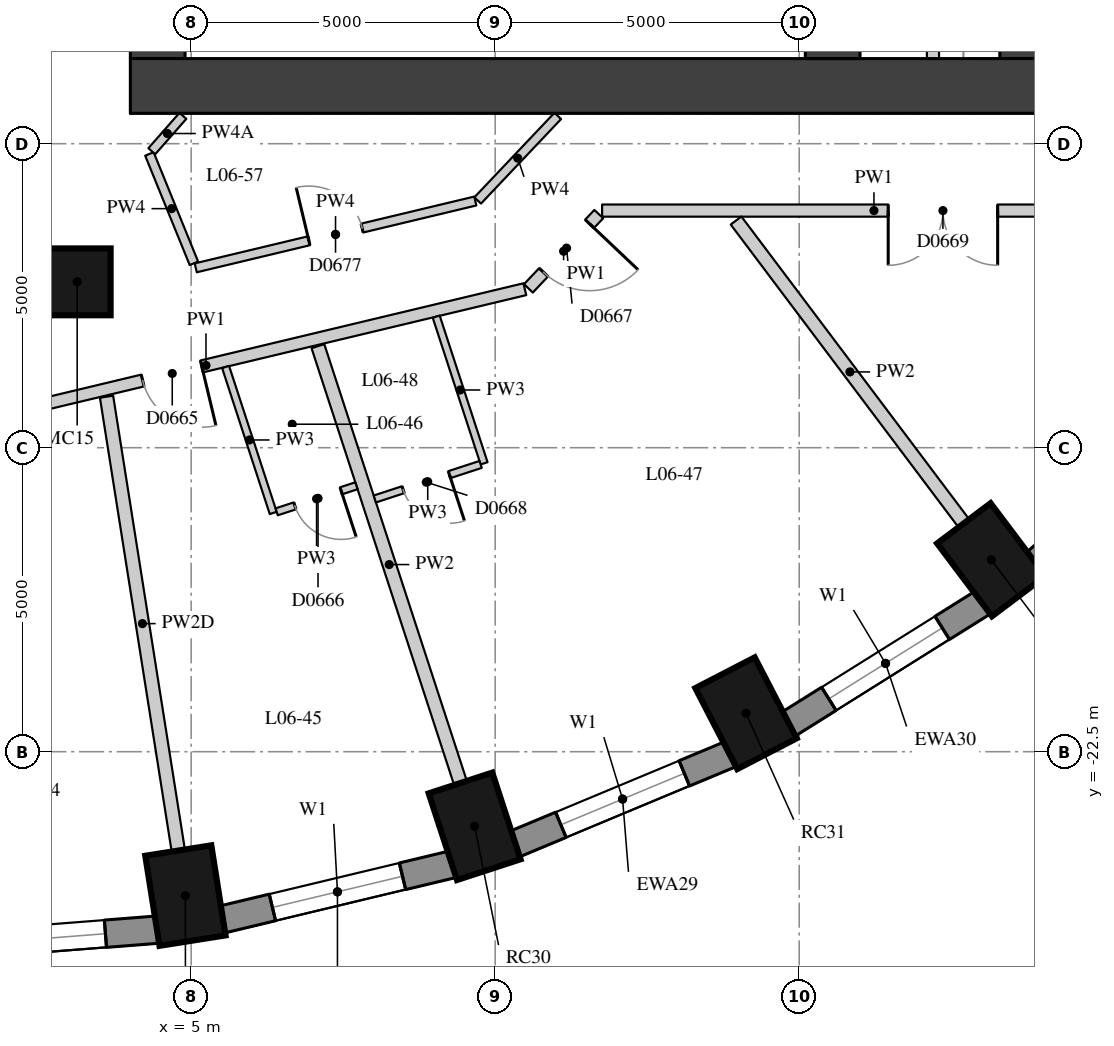
"""IFC4 building model, lengths in metres.
Left out: names, types, materials, properties, quantities, classifications, styles, units other than length and angle.
Written with IfcOpenShell. Run it as: python <this file> out.ifc"""

import sys

from ifc_helpers import new_model, si_unit, direction, frame, frame_2d, origin, origin_2d, place, context, subcontext, project, spatial, rectangle, extrude, element, fill, save


model = new_model("IFC4")
c1 = context("Model", 3, precision=1e-05, world=origin(), true_north=direction((0.0, 1.0)))
c2 = subcontext(c1, "Body", "Model", "MODEL_VIEW")
j1 = project(units=[si_unit("LENGTHUNIT", "METRE"), si_unit("PLANEANGLEUNIT", "RADIAN")], contexts=[c1])
p1 = place(None, origin())
s1 = spatial("IfcSite", under=j1, at=p1, CompositionType="ELEMENT")
p2 = place(p1, origin())
s2 = spatial("IfcBuilding", under=s1, at=p2, CompositionType="ELEMENT")
p3 = place(p2, frame((0.0, 0.0, 28.3)))
s3 = spatial("IfcBuildingStorey", under=s2, at=p3, CompositionType="ELEMENT", Elevation=28.3)
for number, where, z_axis, x_axis in (
    (1, (4.906, -24.866, 0.0), (0.0, 0.0, 1.0), (0.156, -0.988, 0.0)),
    (2, (9.662, -23.727, 0.0), (0.0, 0.0, 1.0), (0.31, -0.951, 0.0)),
    (3, (14.125, -21.867, 0.0), (0.0, 0.0, 1.0), (0.46, -0.888, 0.0)),
    (4, (18.159, -19.343, 0.0), (0.0, 0.0, 1.0), (0.601, -0.799, 0.0)),
):
    element("IfcColumn", number, at=place(p3, frame(where, z_axis=z_axis, x_axis=x_axis)), inside=s3, PredefinedType="COLUMN", context=c2, shape_type="SweptSolid", body=[
        extrude(rectangle(XDim=1.5, YDim=1.1, at=origin_2d()), origin(), (0.0, 0.0, 1.0), 3.3),
    ])
p4 = place(p3, frame((3.126, -14.772, 0.0), z_axis=(0.0, 0.0, 1.0), x_axis=(1.0, 0.0, 0.0)))
e5 = element("IfcColumn", 5, at=p4, inside=s3, PredefinedType="COLUMN", context=c2, shape_type="SweptSolid", body=[
    extrude(rectangle(XDim=1.1, YDim=1.1, at=origin_2d()), origin(), (0.0, 0.0, 1.0), 3.3),
])
p5 = place(p3, frame((0.53, -25.733, 0.0), z_axis=(0.0, 0.0, 1.0), x_axis=(0.996955972145, 0.077966592873, 0.0)))
e6 = element("IfcWall", 6, at=p5, inside=s3, PredefinedType="SOLIDWALL", context=c2, shape_type="SweptSolid", body=[
    extrude(rectangle(XDim=3.939, YDim=0.45, at=frame_2d((1.97, 0.0))), origin(), (0.0, 0.0, 1.0), 3.02),
])
p6 = place(p5, frame((0.87, 0.0, 0.4)))
e7 = element("IfcOpeningElement", 7, at=p6, cuts=e6, PredefinedType="OPENING", context=c2, shape_type="SweptSolid", body=[
    extrude(rectangle(XDim=2.2, YDim=1.75, at=frame_2d((1.1, 0.875))), frame((0.0, 0.235, 0.0), z_axis=(0.0, -1.0, 0.0), x_axis=(1.0, 0.0, 0.0)), (0.0, 0.0, 1.0), 0.47),
])
p7 = place(p3, frame((5.504, -25.26, 0.0), z_axis=(0.0, 0.0, 1.0), x_axis=(0.972496561493, 0.232917233979, 0.0)))
e8 = element("IfcWall", 8, at=p7, inside=s3, PredefinedType="SOLIDWALL", context=c2, shape_type="SweptSolid", body=[
    extrude(rectangle(XDim=3.911, YDim=0.45, at=frame_2d((1.956, 0.0))), origin(), (0.0, 0.0, 1.0), 3.02),
])
p8 = place(p7, frame((0.855, 0.0, 0.4)))
e9 = element("IfcOpeningElement", 9, at=p8, cuts=e8, PredefinedType="OPENING", context=c2, shape_type="SweptSolid", body=[
    extrude(rectangle(XDim=2.2, YDim=1.75, at=frame_2d((1.1, 0.875))), frame((0.0, 0.235, 0.0), z_axis=(0.0, -1.0, 0.0), x_axis=(1.0, 0.0, 0.0)), (0.0, 0.0, 1.0), 0.47),
])
p9 = place(p3, frame((10.315, -24.021, 0.0), z_axis=(0.0, 0.0, 1.0), x_axis=(0.923031964282, 0.384723267966, 0.0)))
e10 = element("IfcWall", 10, at=p9, inside=s3, PredefinedType="SOLIDWALL", context=c2, shape_type="SweptSolid", body=[
    extrude(rectangle(XDim=3.856, YDim=0.45, at=frame_2d((1.928, 0.0))), origin(), (0.0, 0.0, 1.0), 3.02),
])
p10 = place(p9, frame((0.828, 0.0, 0.4)))
e11 = element("IfcOpeningElement", 11, at=p10, cuts=e10, PredefinedType="OPENING", context=c2, shape_type="SweptSolid", body=[
    extrude(rectangle(XDim=2.2, YDim=1.75, at=frame_2d((1.1, 0.875))), frame((0.0, 0.235, 0.0), z_axis=(0.0, -1.0, 0.0), x_axis=(1.0, 0.0, 0.0)), (0.0, 0.0, 1.0), 0.47),
])
p11 = place(p3, frame((14.817, -22.051, 0.0), z_axis=(0.0, 0.0, 1.0), x_axis=(0.847635480093, 0.530579016629, 0.0)))
e12 = element("IfcWall", 12, at=p11, inside=s3, PredefinedType="SOLIDWALL", context=c2, shape_type="SweptSolid", body=[
    extrude(rectangle(XDim=3.782, YDim=0.45, at=frame_2d((1.891, 0.0))), origin(), (0.0, 0.0, 1.0), 3.02),
])
p12 = place(p11, frame((0.791, 0.0, 0.4)))
e13 = element("IfcOpeningElement", 13, at=p12, cuts=e12, PredefinedType="OPENING", context=c2, shape_type="SweptSolid", body=[
    extrude(rectangle(XDim=2.2, YDim=1.75, at=frame_2d((1.1, 0.875))), frame((0.0, 0.235, 0.0), z_axis=(0.0, -1.0, 0.0), x_axis=(1.0, 0.0, 0.0)), (0.0, 0.0, 1.0), 0.47),
])
p13 = place(p3, frame((18.871, -19.407, 0.0), z_axis=(0.0, 0.0, 1.0), x_axis=(0.745526233716, 0.66647628228, 0.0)))
e14 = element("IfcWall", 14, at=p13, inside=s3, PredefinedType="SOLIDWALL", context=c2, shape_type="SweptSolid", body=[
    extrude(rectangle(XDim=3.697, YDim=0.45, at=frame_2d((1.848, 0.0))), origin(), (0.0, 0.0, 1.0), 3.02),
])
p14 = place(p3, frame((4.45, -11.1, 0.0), z_axis=(0.0, 0.0, 1.0), x_axis=(0.0, 1.0, 0.0)))
e15 = element("IfcWall", 15, at=p14, inside=s3, PredefinedType="SHEAR", context=c2, shape_type="SweptSolid", body=[
    extrude(rectangle(XDim=22.2, YDim=0.9, at=frame_2d((11.1, 0.0))), origin(), (0.0, 0.0, 1.0), 3.02),
])
p15 = place(p14, frame((2.35, 0.0, 0.0)))
e16 = element("IfcOpeningElement", 16, at=p15, cuts=e15, PredefinedType="OPENING", context=c2, shape_type="SweptSolid", body=[
    extrude(rectangle(XDim=1.5, YDim=2.1, at=frame_2d((0.75, 1.05))), frame((0.0, 0.46, 0.0), z_axis=(0.0, -1.0, 0.0), x_axis=(1.0, 0.0, 0.0)), (0.0, 0.0, 1.0), 0.92),
])
p16 = place(p14, frame((5.45, 0.0, 0.0)))
e17 = element("IfcOpeningElement", 17, at=p16, cuts=e15, PredefinedType="OPENING", context=c2, shape_type="SweptSolid", body=[
    extrude(rectangle(XDim=1.8, YDim=2.1, at=frame_2d((0.9, 1.05))), frame((0.0, 0.46, 0.0), z_axis=(0.0, -1.0, 0.0), x_axis=(1.0, 0.0, 0.0)), (0.0, 0.0, 1.0), 0.92),
])
p17 = place(p14, frame((7.95, 0.0, 0.0)))
e18 = element("IfcOpeningElement", 18, at=p17, cuts=e15, PredefinedType="OPENING", context=c2, shape_type="SweptSolid", body=[
    extrude(rectangle(XDim=1.1, YDim=2.1, at=frame_2d((0.55, 1.05))), frame((0.0, 0.46, 0.0), z_axis=(0.0, -1.0, 0.0), x_axis=(1.0, 0.0, 0.0)), (0.0, 0.0, 1.0), 0.92),
])
p18 = place(p14, frame((10.6, 0.0, 0.0)))
e19 = element("IfcOpeningElement", 19, at=p18, cuts=e15, PredefinedType="OPENING", context=c2, shape_type="SweptSolid", body=[
    extrude(rectangle(XDim=1.0, YDim=2.1, at=frame_2d((0.5, 1.05))), frame((0.0, 0.46, 0.0), z_axis=(0.0, -1.0, 0.0), x_axis=(1.0, 0.0, 0.0)), (0.0, 0.0, 1.0), 0.92),
])
p19 = place(p14, frame((13.15, 0.0, 0.0)))
e20 = element("IfcOpeningElement", 20, at=p19, cuts=e15, PredefinedType="OPENING", context=c2, shape_type="SweptSolid", body=[
    extrude(rectangle(XDim=1.1, YDim=2.1, at=frame_2d((0.55, 1.05))), frame((0.0, 0.46, 0.0), z_axis=(0.0, -1.0, 0.0), x_axis=(1.0, 0.0, 0.0)), (0.0, 0.0, 1.0), 0.92),
])
p20 = place(p14, frame((14.95, 0.0, 0.0)))
e21 = element("IfcOpeningElement", 21, at=p20, cuts=e15, PredefinedType="OPENING", context=c2, shape_type="SweptSolid", body=[
    extrude(rectangle(XDim=1.8, YDim=2.1, at=frame_2d((0.9, 1.05))), frame((0.0, 0.46, 0.0), z_axis=(0.0, -1.0, 0.0), x_axis=(1.0, 0.0, 0.0)), (0.0, 0.0, 1.0), 0.92),
])
p21 = place(p14, frame((18.35, 0.0, 0.0)))
e22 = element("IfcOpeningElement", 22, at=p21, cuts=e15, PredefinedType="OPENING", context=c2, shape_type="SweptSolid", body=[
    extrude(rectangle(XDim=1.5, YDim=2.1, at=frame_2d((0.75, 1.05))), frame((0.0, 0.46, 0.0), z_axis=(0.0, -1.0, 0.0), x_axis=(1.0, 0.0, 0.0)), (0.0, 0.0, 1.0), 0.92),
])
p22 = place(p3, frame((18.75, -11.1, 0.0), z_axis=(0.0, 0.0, 1.0), x_axis=(0.0, 1.0, 0.0)))
e23 = element("IfcWall", 23, at=p22, inside=s3, PredefinedType="SHEAR", context=c2, shape_type="SweptSolid", body=[
    extrude(rectangle(XDim=22.2, YDim=0.9, at=frame_2d((11.1, 0.0))), origin(), (0.0, 0.0, 1.0), 3.02),
])
p23 = place(p22, frame((16.175, 0.0, 0.0)))
e24 = element("IfcOpeningElement", 24, at=p23, cuts=e23, PredefinedType="OPENING", context=c2, shape_type="SweptSolid", body=[
    extrude(rectangle(XDim=1.5, YDim=2.1, at=frame_2d((0.75, 1.05))), frame((0.0, 0.46, 0.0), z_axis=(0.0, -1.0, 0.0), x_axis=(1.0, 0.0, 0.0)), (0.0, 0.0, 1.0), 0.92),
])
p24 = place(p22, frame((5.025, 0.0, 0.0)))
e25 = element("IfcOpeningElement", 25, at=p24, cuts=e23, PredefinedType="OPENING", context=c2, shape_type="SweptSolid", body=[
    extrude(rectangle(XDim=1.5, YDim=2.1, at=frame_2d((0.75, 1.05))), frame((0.0, 0.46, 0.0), z_axis=(0.0, -1.0, 0.0), x_axis=(1.0, 0.0, 0.0)), (0.0, 0.0, 1.0), 0.92),
])
p25 = place(p3, frame((4.0, -11.55, 0.0), z_axis=(0.0, 0.0, 1.0), x_axis=(1.0, 0.0, 0.0)))
e26 = element("IfcWall", 26, at=p25, inside=s3, PredefinedType="SHEAR", context=c2, shape_type="SweptSolid", body=[
    extrude(rectangle(XDim=15.2, YDim=0.9, at=frame_2d((7.6, 0.0))), origin(), (0.0, 0.0, 1.0), 3.02),
])
p26 = place(p3, frame((15.55, -11.1, 0.0), z_axis=(0.0, 0.0, 1.0), x_axis=(0.0, 1.0, 0.0)))
e27 = element("IfcWall", 27, at=p26, inside=s3, PredefinedType="SHEAR", context=c2, shape_type="SweptSolid", body=[
    extrude(rectangle(XDim=22.2, YDim=0.9, at=frame_2d((11.1, 0.0))), origin(), (0.0, 0.0, 1.0), 3.02),
])
p27 = place(p26, frame((15.6, 0.0, 0.0)))
e28 = element("IfcOpeningElement", 28, at=p27, cuts=e27, PredefinedType="OPENING", context=c2, shape_type="SweptSolid", body=[
    extrude(rectangle(XDim=1.0, YDim=2.1, at=frame_2d((0.5, 1.05))), frame((0.0, 0.46, 0.0), z_axis=(0.0, -1.0, 0.0), x_axis=(1.0, 0.0, 0.0)), (0.0, 0.0, 1.0), 0.92),
])
p28 = place(p26, frame((5.6, 0.0, 0.0)))
e29 = element("IfcOpeningElement", 29, at=p28, cuts=e27, PredefinedType="OPENING", context=c2, shape_type="SweptSolid", body=[
    extrude(rectangle(XDim=1.0, YDim=2.1, at=frame_2d((0.5, 1.05))), frame((0.0, 0.46, 0.0), z_axis=(0.0, -1.0, 0.0), x_axis=(1.0, 0.0, 0.0)), (0.0, 0.0, 1.0), 0.92),
])
p29 = place(p3, frame((17.2, -11.1, 0.0), z_axis=(0.0, 0.0, 1.0), x_axis=(0.0, 1.0, 0.0)))
e30 = element("IfcWall", 30, at=p29, inside=s3, PredefinedType="PARTITIONING", context=c2, shape_type="SweptSolid", body=[
    extrude(rectangle(XDim=4.7, YDim=0.2, at=frame_2d((2.35, 0.0))), origin(), (0.0, 0.0, 1.0), 3.02),
])
p30 = place(p3, frame((20.7, -13.6, 0.0), z_axis=(0.0, 0.0, 1.0), x_axis=(-1.0, 0.0, 0.0)))
e31 = element("IfcWall", 31, at=p30, inside=s3, PredefinedType="PARTITIONING", context=c2, shape_type="SweptSolid", body=[
    extrude(rectangle(XDim=8.941, YDim=0.2, at=frame_2d((4.471, 0.0))), origin(), (0.0, 0.0, 1.0), 3.02),
])
p31 = place(p30, frame((2.436, 0.0, 0.0)))
e32 = element("IfcOpeningElement", 32, at=p31, cuts=e31, PredefinedType="OPENING", context=c2, shape_type="SweptSolid", body=[
    extrude(rectangle(XDim=1.8, YDim=2.1, at=frame_2d((0.9, 1.05))), frame((0.0, 0.11, 0.0), z_axis=(0.0, -1.0, 0.0), x_axis=(1.0, 0.0, 0.0)), (0.0, 0.0, 1.0), 0.22),
])
p32 = place(p3, frame((11.704, -13.658, 0.0), z_axis=(0.0, 0.0, 1.0), x_axis=(-0.687768795377, -0.725929806597, 0.0)))
e33 = element("IfcWall", 33, at=p32, inside=s3, PredefinedType="PARTITIONING", context=c2, shape_type="SweptSolid", body=[
    extrude(rectangle(XDim=1.683, YDim=0.2, at=frame_2d((0.841, 0.0))), origin(), (0.0, 0.0, 1.0), 3.02),
])
p33 = place(p32, frame((0.22, 0.0, 0.0)))
e34 = element("IfcOpeningElement", 34, at=p33, cuts=e33, PredefinedType="OPENING", context=c2, shape_type="SweptSolid", body=[
    extrude(rectangle(XDim=1.1, YDim=2.1, at=frame_2d((0.55, 1.05))), frame((0.0, 0.11, 0.0), z_axis=(0.0, -1.0, 0.0), x_axis=(1.0, 0.0, 0.0)), (0.0, 0.0, 1.0), 0.22),
])
p34 = place(p3, frame((10.488, -14.893, 0.0), z_axis=(0.0, 0.0, 1.0), x_axis=(-0.972603489924, -0.23247032367, 0.0)))
e35 = element("IfcWall", 35, at=p34, inside=s3, PredefinedType="PARTITIONING", context=c2, shape_type="SweptSolid", body=[
    extrude(rectangle(XDim=10.783, YDim=0.2, at=frame_2d((5.392, 0.0))), origin(), (0.0, 0.0, 1.0), 3.02),
])
p35 = place(p34, frame((8.59, 0.0, 0.0)))
e36 = element("IfcOpeningElement", 36, at=p35, cuts=e35, PredefinedType="OPENING", context=c2, shape_type="SweptSolid", body=[
    extrude(rectangle(XDim=0.9, YDim=2.1, at=frame_2d((0.45, 1.05))), frame((0.0, 0.11, 0.0), z_axis=(0.0, -1.0, 0.0), x_axis=(1.0, 0.0, 0.0)), (0.0, 0.0, 1.0), 0.22),
])
p36 = place(p34, frame((5.462, 0.0, 0.0)))
e37 = element("IfcOpeningElement", 37, at=p36, cuts=e35, PredefinedType="OPENING", context=c2, shape_type="SweptSolid", body=[
    extrude(rectangle(XDim=1.0, YDim=2.1, at=frame_2d((0.5, 1.05))), frame((0.0, 0.11, 0.0), z_axis=(0.0, -1.0, 0.0), x_axis=(1.0, 0.0, 0.0)), (0.0, 0.0, 1.0), 0.22),
])
p37 = place(p3, frame((11.03, -12.043, 0.0), z_axis=(0.0, 0.0, 1.0), x_axis=(-0.687734044261, -0.725962729322, 0.0)))
e38 = element("IfcWall", 38, at=p37, inside=s3, PredefinedType="PARTITIONING", context=c2, shape_type="SweptSolid", body=[
    extrude(rectangle(XDim=1.916, YDim=0.15, at=frame_2d((0.958, 0.0))), origin(), (0.0, 0.0, 1.0), 3.02),
])
p38 = place(p3, frame((9.673, -13.443, 0.0), z_axis=(0.0, 0.0, 1.0), x_axis=(-0.972603013932, -0.232472315103, 0.0)))
e39 = element("IfcWall", 39, at=p38, inside=s3, PredefinedType="PARTITIONING", context=c2, shape_type="SweptSolid", body=[
    extrude(rectangle(XDim=4.727, YDim=0.15, at=frame_2d((2.363, 0.0))), origin(), (0.0, 0.0, 1.0), 3.02),
])
p39 = place(p38, frame((1.914, 0.0, 0.0)))
e40 = element("IfcOpeningElement", 40, at=p39, cuts=e39, PredefinedType="OPENING", context=c2, shape_type="SweptSolid", body=[
    extrude(rectangle(XDim=0.9, YDim=2.1, at=frame_2d((0.45, 1.05))), frame((0.0, 0.085, 0.0), z_axis=(0.0, -1.0, 0.0), x_axis=(1.0, 0.0, 0.0)), (0.0, 0.0, 1.0), 0.17),
])
p40 = place(p3, frame((5.045, -14.468, 0.0), z_axis=(0.0, 0.0, 1.0), x_axis=(-0.376889538578, 0.926258212223, 0.0)))
e41 = element("IfcWall", 41, at=p40, inside=s3, PredefinedType="PARTITIONING", context=c2, shape_type="SweptSolid", body=[
    extrude(rectangle(XDim=1.942, YDim=0.15, at=frame_2d((0.971, 0.0))), origin(), (0.0, 0.0, 1.0), 3.02),
])
p41 = place(p3, frame((4.353, -12.623, 0.0), z_axis=(0.0, 0.0, 1.0), x_axis=(0.660265480509, 0.751032286422, 0.0)))
e42 = element("IfcWall", 42, at=p41, inside=s3, PredefinedType="PARTITIONING", context=c2, shape_type="SweptSolid", body=[
    extrude(rectangle(XDim=0.775, YDim=0.15, at=frame_2d((0.387, 0.0))), origin(), (0.0, 0.0, 1.0), 2.57),
])
p42 = place(p3, frame((4.788, -24.125, 0.0), z_axis=(0.0, 0.0, 1.0), x_axis=(-0.156131781396, 0.987736233434, 0.0)))
e43 = element("IfcWall", 43, at=p42, inside=s3, PredefinedType="PARTITIONING", context=c2, shape_type="SweptSolid", body=[
    extrude(rectangle(XDim=7.557, YDim=0.22, at=frame_2d((3.779, 0.0))), origin(), (0.0, 0.0, 1.0), 2.47),
])
p43 = place(p3, frame((9.429, -23.014, 0.0), z_axis=(0.0, 0.0, 1.0), x_axis=(-0.310261176215, 0.950651356983, 0.0)))
e44 = element("IfcWall", 44, at=p43, inside=s3, PredefinedType="PARTITIONING", context=c2, shape_type="SweptSolid", body=[
    extrude(rectangle(XDim=7.557, YDim=0.22, at=frame_2d((3.779, 0.0))), origin(), (0.0, 0.0, 1.0), 3.02),
])
p44 = place(p3, frame((17.708, -18.743, 0.0), z_axis=(0.0, 0.0, 1.0), x_axis=(-0.601177883261, 0.799115231164, 0.0)))
e45 = element("IfcWall", 45, at=p44, inside=s3, PredefinedType="PARTITIONING", context=c2, shape_type="SweptSolid", body=[
    extrude(rectangle(XDim=6.231, YDim=0.22, at=frame_2d((3.116, 0.0))), origin(), (0.0, 0.0, 1.0), 3.02),
])
p45 = place(p3, frame((5.566, -16.172, 0.0), z_axis=(0.0, 0.0, 1.0), x_axis=(0.310159281599, -0.950684605975, 0.0)))
e46 = element("IfcWall", 46, at=p45, inside=s3, PredefinedType="PARTITIONING", context=c2, shape_type="SweptSolid", body=[
    extrude(rectangle(XDim=2.525, YDim=0.12, at=frame_2d((1.263, 0.0))), origin(), (0.0, 0.0, 1.0), 3.02),
])
p46 = place(p3, frame((9.03, -15.344, 0.0), z_axis=(0.0, 0.0, 1.0), x_axis=(0.310275804943, -0.950646582525, 0.0)))
e47 = element("IfcWall", 47, at=p46, inside=s3, PredefinedType="PARTITIONING", context=c2, shape_type="SweptSolid", body=[
    extrude(rectangle(XDim=2.538, YDim=0.12, at=frame_2d((1.269, 0.0))), origin(), (0.0, 0.0, 1.0), 3.02),
])
p47 = place(p3, frame((6.407, -18.554, 0.0), z_axis=(0.0, 0.0, 1.0), x_axis=(0.950628893115, 0.310329997864, 0.0)))
e48 = element("IfcWall", 48, at=p47, inside=s3, PredefinedType="PARTITIONING", context=c2, shape_type="SweptSolid", body=[
    extrude(rectangle(XDim=1.38, YDim=0.12, at=frame_2d((0.69, 0.0))), origin(), (0.0, 0.0, 1.0), 3.02),
])
p48 = place(p47, frame((0.315, 0.0, 0.0)))
e49 = element("IfcOpeningElement", 49, at=p48, cuts=e48, PredefinedType="OPENING", context=c2, shape_type="SweptSolid", body=[
    extrude(rectangle(XDim=0.8, YDim=2.1, at=frame_2d((0.4, 1.05))), frame((0.0, 0.07, 0.0), z_axis=(0.0, -1.0, 0.0), x_axis=(1.0, 0.0, 0.0)), (0.0, 0.0, 1.0), 0.14),
])
p49 = place(p3, frame((9.76, -17.775, 0.0), z_axis=(0.0, 0.0, 1.0), x_axis=(-0.950599833202, -0.310419002506, 0.0)))
e50 = element("IfcWall", 50, at=p49, inside=s3, PredefinedType="PARTITIONING", context=c2, shape_type="SweptSolid", body=[
    extrude(rectangle(XDim=1.83, YDim=0.12, at=frame_2d((0.915, 0.0))), origin(), (0.0, 0.0, 1.0), 3.02),
])
p50 = place(p49, frame((0.54, 0.0, 0.0)))
e51 = element("IfcOpeningElement", 51, at=p50, cuts=e50, PredefinedType="OPENING", context=c2, shape_type="SweptSolid", body=[
    extrude(rectangle(XDim=0.8, YDim=2.1, at=frame_2d((0.4, 1.05))), frame((0.0, 0.07, 0.0), z_axis=(0.0, -1.0, 0.0), x_axis=(1.0, 0.0, 0.0)), (0.0, 0.0, 1.0), 0.14),
])
p51 = place(p6, origin())
e52 = element("IfcWindow", 52, at=p51, inside=s3, PartitioningType="SINGLE_PANEL", PredefinedType="WINDOW", context=c2, shape_type="SweptSolid", body=[
    extrude(rectangle(XDim=2.2, YDim=1.75, at=frame_2d((1.1, 0.875))), frame((0.0, 0.035, 0.0), z_axis=(0.0, -1.0, 0.0), x_axis=(1.0, 0.0, 0.0)), (0.0, 0.0, 1.0), 0.06),
])
fill(e7, e52)
p52 = place(p8, origin())
e53 = element("IfcWindow", 53, at=p52, inside=s3, PartitioningType="SINGLE_PANEL", PredefinedType="WINDOW", context=c2, shape_type="SweptSolid", body=[
    extrude(rectangle(XDim=2.2, YDim=1.75, at=frame_2d((1.1, 0.875))), frame((0.0, 0.035, 0.0), z_axis=(0.0, -1.0, 0.0), x_axis=(1.0, 0.0, 0.0)), (0.0, 0.0, 1.0), 0.06),
])
fill(e9, e53)
p53 = place(p10, origin())
e54 = element("IfcWindow", 54, at=p53, inside=s3, PartitioningType="SINGLE_PANEL", PredefinedType="WINDOW", context=c2, shape_type="SweptSolid", body=[
    extrude(rectangle(XDim=2.2, YDim=1.75, at=frame_2d((1.1, 0.875))), frame((0.0, 0.035, 0.0), z_axis=(0.0, -1.0, 0.0), x_axis=(1.0, 0.0, 0.0)), (0.0, 0.0, 1.0), 0.06),
])
fill(e11, e54)
p54 = place(p12, origin())
e55 = element("IfcWindow", 55, at=p54, inside=s3, PartitioningType="SINGLE_PANEL", PredefinedType="WINDOW", context=c2, shape_type="SweptSolid", body=[
    extrude(rectangle(XDim=2.2, YDim=1.75, at=frame_2d((1.1, 0.875))), frame((0.0, 0.035, 0.0), z_axis=(0.0, -1.0, 0.0), x_axis=(1.0, 0.0, 0.0)), (0.0, 0.0, 1.0), 0.06),
])
fill(e13, e55)
p55 = place(p36, origin())
e56 = element("IfcDoor", 56, at=p55, inside=s3, OperationType="SINGLE_SWING_LEFT", PredefinedType="DOOR", context=c2, shape_type="SweptSolid", body=[
    extrude(rectangle(XDim=1.0, YDim=2.1, at=frame_2d((0.5, 1.05))), frame((0.0, 0.025, 0.0), z_axis=(0.0, -1.0, 0.0), x_axis=(1.0, 0.0, 0.0)), (0.0, 0.0, 1.0), 0.05),
])
fill(e37, e56)
p56 = place(p48, origin())
e57 = element("IfcDoor", 57, at=p56, inside=s3, OperationType="SINGLE_SWING_LEFT", PredefinedType="DOOR", context=c2, shape_type="SweptSolid", body=[
    extrude(rectangle(XDim=0.8, YDim=2.1, at=frame_2d((0.4, 1.05))), frame((0.0, 0.025, 0.0), z_axis=(0.0, -1.0, 0.0), x_axis=(1.0, 0.0, 0.0)), (0.0, 0.0, 1.0), 0.05),
])
fill(e49, e57)
p57 = place(p33, origin())
e58 = element("IfcDoor", 58, at=p57, inside=s3, OperationType="SINGLE_SWING_LEFT", PredefinedType="DOOR", context=c2, shape_type="SweptSolid", body=[
    extrude(rectangle(XDim=1.1, YDim=2.1, at=frame_2d((0.55, 1.05))), frame((0.0, 0.025, 0.0), z_axis=(0.0, -1.0, 0.0), x_axis=(1.0, 0.0, 0.0)), (0.0, 0.0, 1.0), 0.05),
])
fill(e34, e58)
p58 = place(p50, origin())
e59 = element("IfcDoor", 59, at=p58, inside=s3, OperationType="SINGLE_SWING_LEFT", PredefinedType="DOOR", context=c2, shape_type="SweptSolid", body=[
    extrude(rectangle(XDim=0.8, YDim=2.1, at=frame_2d((0.4, 1.05))), frame((0.0, 0.025, 0.0), z_axis=(0.0, -1.0, 0.0), x_axis=(1.0, 0.0, 0.0)), (0.0, 0.0, 1.0), 0.05),
])
fill(e51, e59)
p59 = place(p31, origin())
e60 = element("IfcDoor", 60, at=p59, inside=s3, OperationType="DOUBLE_DOOR_SINGLE_SWING", PredefinedType="DOOR", context=c2, shape_type="SweptSolid", body=[
    extrude(rectangle(XDim=1.8, YDim=2.1, at=frame_2d((0.9, 1.05))), frame((0.0, 0.025, 0.0), z_axis=(0.0, -1.0, 0.0), x_axis=(1.0, 0.0, 0.0)), (0.0, 0.0, 1.0), 0.05),
])
fill(e32, e60)
p60 = place(p39, origin())
e61 = element("IfcDoor", 61, at=p60, inside=s3, OperationType="SINGLE_SWING_LEFT", PredefinedType="DOOR", context=c2, shape_type="SweptSolid", body=[
    extrude(rectangle(XDim=0.9, YDim=2.1, at=frame_2d((0.45, 1.05))), frame((0.0, 0.025, 0.0), z_axis=(0.0, -1.0, 0.0), x_axis=(1.0, 0.0, 0.0)), (0.0, 0.0, 1.0), 0.05),
])
fill(e40, e61)
save(model, sys.argv[1])
